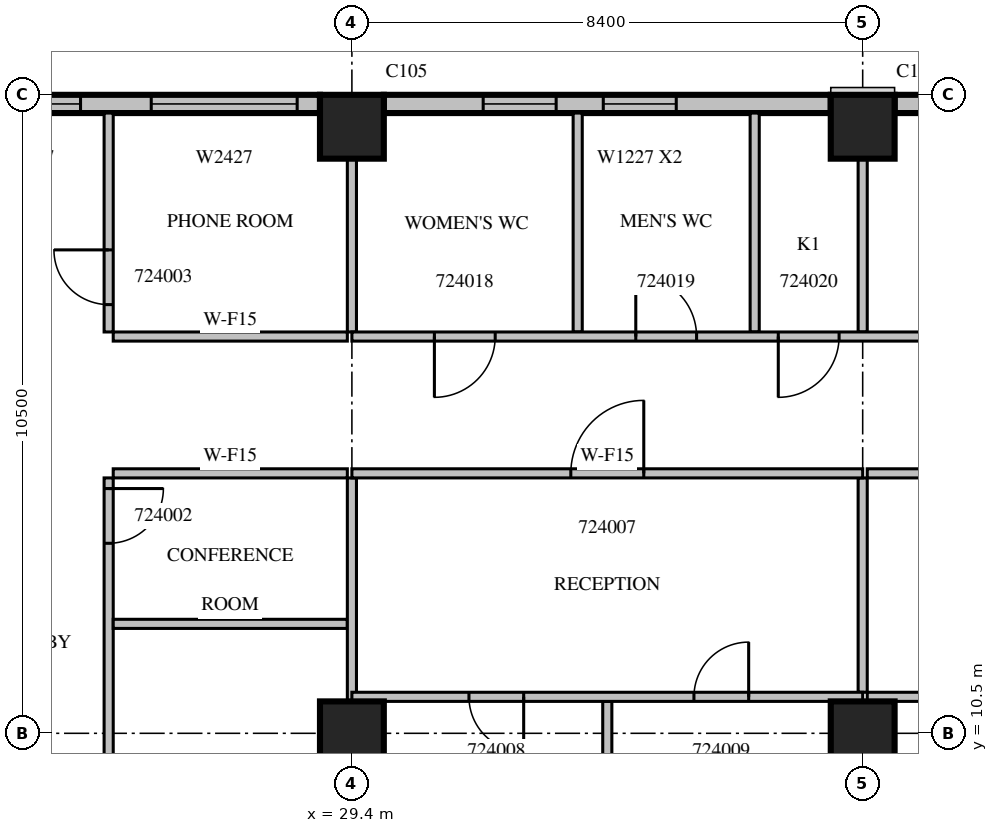
"""IFC4 building model, lengths in metres.
Left out: names, types, materials, properties, quantities, classifications, styles, units other than length and angle.
Written with IfcOpenShell. Run it as: python <this file> out.ifc"""

import sys

from ifc_helpers import new_model, si_unit, direction, frame, frame_2d, origin, origin_2d, place, context, subcontext, project, spatial, rectangle, extrude, source, transform, mapped, element, fill, save


model = new_model("IFC4")
c1 = context("Model", 3, precision=1e-05, world=origin(), true_north=direction((0.0, 1.0)))
c2 = subcontext(c1, "Body", "Model", "MODEL_VIEW")
j1 = project(units=[si_unit("LENGTHUNIT", "METRE"), si_unit("PLANEANGLEUNIT", "RADIAN")], contexts=[c1])
p1 = place(None, origin())
s1 = spatial("IfcSite", under=j1, at=p1, CompositionType="ELEMENT")
p2 = place(p1, origin())
s2 = spatial("IfcBuilding", under=s1, at=p2, CompositionType="ELEMENT")
p3 = place(p2, frame((0.0, 0.0, 111.9)))
s3 = spatial("IfcBuildingStorey", under=s2, at=p3, CompositionType="ELEMENT", Elevation=111.9)
m1 = source(origin(), c2, "Body", "SweptSolid", [
    extrude(rectangle(XDim=1.05, YDim=1.05, at=origin_2d()), origin(), (0.0, 0.0, 1.0), 4.2),
])
for number, where, z_axis, x_axis in (
    (1, (29.4, 10.5, 0.0), (0.0, 0.0, 1.0), (1.0, 0.0, 0.0)),
    (2, (37.8, 10.5, 0.0), (0.0, 0.0, 1.0), (1.0, 0.0, 0.0)),
    (3, (29.4, 20.475, 0.0), (0.0, 0.0, 1.0), (1.0, 0.0, 0.0)),
    (4, (37.8, 20.475, 0.0), (0.0, 0.0, 1.0), (1.0, 0.0, 0.0)),
):
    element("IfcColumn", number, at=place(p3, frame(where, z_axis=z_axis, x_axis=x_axis)), inside=s3, PredefinedType="COLUMN", context=c2, shape_type="MappedRepresentation", body=[
        mapped(m1, transform((0.0, 0.0, 0.0), scale=1.0)),
    ])
m2 = source(origin(), c2, "Body", "SweptSolid", [
    extrude(rectangle(XDim=7.35, YDim=0.3, at=frame_2d((3.675, 0.0))), origin(), (0.0, 0.0, 1.0), 3.8),
])
p4 = place(p3, frame((45.675, 20.85, 0.0), z_axis=(0.0, 0.0, 1.0), x_axis=(-1.0, 0.0, 0.0)))
e5 = element("IfcWall", 5, at=p4, inside=s3, PredefinedType="STANDARD", context=c2, shape_type="MappedRepresentation", body=[
    mapped(m2, transform((0.0, 0.0, 0.0), scale=1.0)),
])
m3 = source(origin(), c2, "Body", "SweptSolid", [
    extrude(rectangle(XDim=1.2, YDim=2.7, at=frame_2d((0.6, 1.35))), frame((0.0, 0.16, 0.0), z_axis=(0.0, -1.0, 0.0), x_axis=(1.0, 0.0, 0.0)), (0.0, 0.0, 1.0), 0.32),
])
p5 = place(p4, frame((2.141, 0.0, 0.6)))
e6 = element("IfcOpeningElement", 6, at=p5, cuts=e5, PredefinedType="OPENING", context=c2, shape_type="MappedRepresentation", body=[
    mapped(m3, transform((0.0, 0.0, 0.0), scale=1.0)),
])
m4 = source(origin(), c2, "Body", "SweptSolid", [
    extrude(rectangle(XDim=2.4, YDim=2.7, at=frame_2d((1.2, 1.35))), frame((0.0, 0.16, 0.0), z_axis=(0.0, -1.0, 0.0), x_axis=(1.0, 0.0, 0.0)), (0.0, 0.0, 1.0), 0.32),
])
p6 = place(p4, frame((4.213, 0.0, 0.6)))
e7 = element("IfcOpeningElement", 7, at=p6, cuts=e5, PredefinedType="OPENING", context=c2, shape_type="MappedRepresentation", body=[
    mapped(m4, transform((0.0, 0.0, 0.0), scale=1.0)),
])
p7 = place(p3, frame((37.275, 20.85, 0.0), z_axis=(0.0, 0.0, 1.0), x_axis=(-1.0, 0.0, 0.0)))
e8 = element("IfcWall", 8, at=p7, inside=s3, PredefinedType="STANDARD", context=c2, shape_type="MappedRepresentation", body=[
    mapped(m2, transform((0.0, 0.0, 0.0), scale=1.0)),
])
p8 = place(p7, frame((2.541, 0.0, 0.6)))
e9 = element("IfcOpeningElement", 9, at=p8, cuts=e8, PredefinedType="OPENING", context=c2, shape_type="MappedRepresentation", body=[
    mapped(m3, transform((0.0, 0.0, 0.0), scale=1.0)),
])
p9 = place(p7, frame((4.516, 0.0, 0.6)))
e10 = element("IfcOpeningElement", 10, at=p9, cuts=e8, PredefinedType="OPENING", context=c2, shape_type="MappedRepresentation", body=[
    mapped(m3, transform((0.0, 0.0, 0.0), scale=1.0)),
])
m5 = source(origin(), c2, "Body", "SweptSolid", [
    extrude(rectangle(XDim=6.875, YDim=0.3, at=frame_2d((3.438, 0.0))), origin(), (0.0, 0.0, 1.0), 3.8),
])
p10 = place(p3, frame((28.875, 20.85, 0.0), z_axis=(0.0, 0.0, 1.0), x_axis=(-1.0, 0.0, 0.0)))
e11 = element("IfcWall", 11, at=p10, inside=s3, PredefinedType="STANDARD", context=c2, shape_type="MappedRepresentation", body=[
    mapped(m5, transform((0.0, 0.0, 0.0), scale=1.0)),
])
p11 = place(p10, frame((0.375, 0.0, 0.6)))
e12 = element("IfcOpeningElement", 12, at=p11, cuts=e11, PredefinedType="OPENING", context=c2, shape_type="MappedRepresentation", body=[
    mapped(m4, transform((0.0, 0.0, 0.0), scale=1.0)),
])
m6 = source(origin(), c2, "Body", "SweptSolid", [
    extrude(rectangle(XDim=1.8, YDim=2.7, at=frame_2d((0.9, 1.35))), frame((0.0, 0.16, 0.0), z_axis=(0.0, -1.0, 0.0), x_axis=(1.0, 0.0, 0.0)), (0.0, 0.0, 1.0), 0.32),
])
p12 = place(p10, frame((3.938, 0.0, 0.6)))
e13 = element("IfcOpeningElement", 13, at=p12, cuts=e11, PredefinedType="OPENING", context=c2, shape_type="MappedRepresentation", body=[
    mapped(m6, transform((0.0, 0.0, 0.0), scale=1.0)),
])
p13 = place(p3, frame((25.4, 14.7, 0.0), z_axis=(0.0, 0.0, 1.0), x_axis=(0.0, -1.0, 0.0)))
e14 = element("IfcWall", 14, at=p13, inside=s3, PredefinedType="PARTITIONING", context=c2, shape_type="SweptSolid", body=[
    extrude(rectangle(XDim=11.425, YDim=0.15, at=frame_2d((5.713, 0.0))), origin(), (0.0, 0.0, 1.0), 3.8),
])
m7 = source(origin(), c2, "Body", "SweptSolid", [
    extrude(rectangle(XDim=0.9, YDim=2.1, at=frame_2d((0.45, 1.05))), frame((0.0, 0.085, 0.0), z_axis=(0.0, -1.0, 0.0), x_axis=(1.0, 0.0, 0.0)), (0.0, 0.0, 1.0), 0.17),
])
p14 = place(p13, frame((6.763, 0.0, 0.0)))
e15 = element("IfcOpeningElement", 15, at=p14, cuts=e14, PredefinedType="OPENING", context=c2, shape_type="MappedRepresentation", body=[
    mapped(m7, transform((0.0, 0.0, 0.0), scale=1.0)),
])
p15 = place(p13, frame((0.175, 0.0, 0.0)))
e16 = element("IfcOpeningElement", 16, at=p15, cuts=e14, PredefinedType="OPENING", context=c2, shape_type="MappedRepresentation", body=[
    mapped(m7, transform((0.0, 0.0, 0.0), scale=1.0)),
])
m8 = source(origin(), c2, "Body", "SweptSolid", [
    extrude(rectangle(XDim=3.6, YDim=0.15, at=frame_2d((1.8, 0.0))), origin(), (0.0, 0.0, 1.0), 3.8),
])
p16 = place(p3, frame((25.4, 20.7, 0.0), z_axis=(0.0, 0.0, 1.0), x_axis=(0.0, -1.0, 0.0)))
e17 = element("IfcWall", 17, at=p16, inside=s3, PredefinedType="PARTITIONING", context=c2, shape_type="MappedRepresentation", body=[
    mapped(m8, transform((0.0, 0.0, 0.0), scale=1.0)),
])
p17 = place(p16, frame((2.25, 0.0, 0.0)))
e18 = element("IfcOpeningElement", 18, at=p17, cuts=e17, PredefinedType="OPENING", context=c2, shape_type="MappedRepresentation", body=[
    mapped(m7, transform((0.0, 0.0, 0.0), scale=1.0)),
])
m9 = source(origin(), c2, "Body", "SweptSolid", [
    extrude(rectangle(XDim=3.85, YDim=0.15, at=frame_2d((1.925, 0.0))), origin(), (0.0, 0.0, 1.0), 3.8),
])
for number, where, z_axis, x_axis in (
    (19, (29.325, 12.3, 0.0), (0.0, 0.0, 1.0), (-1.0, 0.0, 0.0)),
    (20, (29.325, 14.775, 0.0), (0.0, 0.0, 1.0), (-1.0, 0.0, 0.0)),
    (21, (25.475, 17.025, 0.0), (0.0, 0.0, 1.0), (1.0, 0.0, 0.0)),
):
    element("IfcWall", number, at=place(p3, frame(where, z_axis=z_axis, x_axis=x_axis)), inside=s3, PredefinedType="PARTITIONING", context=c2, shape_type="MappedRepresentation", body=[
        mapped(m9, transform((0.0, 0.0, 0.0), scale=1.0)),
    ])
m10 = source(origin(), c2, "Body", "SweptSolid", [
    extrude(rectangle(XDim=3.676, YDim=0.15, at=frame_2d((1.838, 0.0))), origin(), (0.0, 0.0, 1.0), 3.8),
])
p18 = place(p3, frame((29.4, 11.024, 0.0), z_axis=(0.0, 0.0, 1.0), x_axis=(0.0, 1.0, 0.0)))
e22 = element("IfcWall", 22, at=p18, inside=s3, PredefinedType="PARTITIONING", context=c2, shape_type="MappedRepresentation", body=[
    mapped(m10, transform((0.0, 0.0, 0.0), scale=1.0)),
])
m11 = source(origin(), c2, "Body", "SweptSolid", [
    extrude(rectangle(XDim=2.851, YDim=0.15, at=frame_2d((1.425, 0.0))), origin(), (0.0, 0.0, 1.0), 3.8),
])
p19 = place(p3, frame((29.4, 17.1, 0.0), z_axis=(0.0, 0.0, 1.0), x_axis=(0.0, 1.0, 0.0)))
e23 = element("IfcWall", 23, at=p19, inside=s3, PredefinedType="PARTITIONING", context=c2, shape_type="MappedRepresentation", body=[
    mapped(m11, transform((0.0, 0.0, 0.0), scale=1.0)),
])
m12 = source(origin(), c2, "Body", "SweptSolid", [
    extrude(rectangle(XDim=6.45, YDim=0.15, at=frame_2d((3.225, 0.0))), origin(), (0.0, 0.0, 1.0), 3.8),
])
p20 = place(p3, frame((37.875, 11.1, 0.0), z_axis=(0.0, 0.0, 1.0), x_axis=(1.0, 0.0, 0.0)))
e24 = element("IfcWall", 24, at=p20, inside=s3, PredefinedType="PARTITIONING", context=c2, shape_type="MappedRepresentation", body=[
    mapped(m12, transform((0.0, 0.0, 0.0), scale=1.0)),
])
p21 = place(p3, frame((44.325, 14.775, 0.0), z_axis=(0.0, 0.0, 1.0), x_axis=(-1.0, 0.0, 0.0)))
e25 = element("IfcWall", 25, at=p21, inside=s3, PredefinedType="PARTITIONING", context=c2, shape_type="MappedRepresentation", body=[
    mapped(m12, transform((0.0, 0.0, 0.0), scale=1.0)),
])
p22 = place(p21, frame((2.812, 0.0, 0.0)))
e26 = element("IfcOpeningElement", 26, at=p22, cuts=e25, PredefinedType="OPENING", context=c2, shape_type="MappedRepresentation", body=[
    mapped(m7, transform((0.0, 0.0, 0.0), scale=1.0)),
])
m13 = source(origin(), c2, "Body", "SweptSolid", [
    extrude(rectangle(XDim=10.725, YDim=0.15, at=frame_2d((5.362, 0.0))), origin(), (0.0, 0.0, 1.0), 3.8),
])
p23 = place(p3, frame((33.6, 0.3, 0.0), z_axis=(0.0, 0.0, 1.0), x_axis=(0.0, 1.0, 0.0)))
e27 = element("IfcWall", 27, at=p23, inside=s3, PredefinedType="PARTITIONING", context=c2, shape_type="MappedRepresentation", body=[
    mapped(m13, transform((0.0, 0.0, 0.0), scale=1.0)),
])
m14 = source(origin(), c2, "Body", "SweptSolid", [
    extrude(rectangle(XDim=3.525, YDim=0.15, at=frame_2d((1.762, 0.0))), origin(), (0.0, 0.0, 1.0), 3.8),
])
p24 = place(p3, frame((37.8, 11.175, 0.0), z_axis=(0.0, 0.0, 1.0), x_axis=(0.0, 1.0, 0.0)))
e28 = element("IfcWall", 28, at=p24, inside=s3, PredefinedType="PARTITIONING", context=c2, shape_type="MappedRepresentation", body=[
    mapped(m14, transform((0.0, 0.0, 0.0), scale=1.0)),
])
m15 = source(origin(), c2, "Body", "SweptSolid", [
    extrude(rectangle(XDim=8.4, YDim=0.15, at=frame_2d((4.2, 0.0))), origin(), (0.0, 0.0, 1.0), 3.8),
])
p25 = place(p3, frame((37.8, 11.1, 0.0), z_axis=(0.0, 0.0, 1.0), x_axis=(-1.0, 0.0, 0.0)))
e29 = element("IfcWall", 29, at=p25, inside=s3, PredefinedType="PARTITIONING", context=c2, shape_type="MappedRepresentation", body=[
    mapped(m15, transform((0.0, 0.0, 0.0), scale=1.0)),
])
p26 = place(p25, frame((5.575, 0.0, 0.0)))
e30 = element("IfcOpeningElement", 30, at=p26, cuts=e29, PredefinedType="OPENING", context=c2, shape_type="MappedRepresentation", body=[
    mapped(m7, transform((0.0, 0.0, 0.0), scale=1.0)),
])
p27 = place(p25, frame((1.875, 0.0, 0.0)))
e31 = element("IfcOpeningElement", 31, at=p27, cuts=e29, PredefinedType="OPENING", context=c2, shape_type="MappedRepresentation", body=[
    mapped(m7, transform((0.0, 0.0, 0.0), scale=1.0)),
])
for number, where, z_axis, x_axis in (
    (32, (33.113, 20.7, 0.0), (0.0, 0.0, 1.0), (0.0, -1.0, 0.0)),
    (33, (36.024, 20.7, 0.0), (0.0, 0.0, 1.0), (0.0, -1.0, 0.0)),
):
    element("IfcWall", number, at=place(p3, frame(where, z_axis=z_axis, x_axis=x_axis)), inside=s3, PredefinedType="PARTITIONING", context=c2, shape_type="MappedRepresentation", body=[
        mapped(m8, transform((0.0, 0.0, 0.0), scale=1.0)),
    ])
p28 = place(p3, frame((37.8, 17.1, 0.0), z_axis=(0.0, 0.0, 1.0), x_axis=(0.0, 1.0, 0.0)))
e34 = element("IfcWall", 34, at=p28, inside=s3, PredefinedType="PARTITIONING", context=c2, shape_type="MappedRepresentation", body=[
    mapped(m11, transform((0.0, 0.0, 0.0), scale=1.0)),
])
p29 = place(p3, frame((37.8, 14.775, 0.0), z_axis=(0.0, 0.0, 1.0), x_axis=(-1.0, 0.0, 0.0)))
e35 = element("IfcWall", 35, at=p29, inside=s3, PredefinedType="PARTITIONING", context=c2, shape_type="MappedRepresentation", body=[
    mapped(m15, transform((0.0, 0.0, 0.0), scale=1.0)),
])
m16 = source(origin(), c2, "Body", "SweptSolid", [
    extrude(rectangle(XDim=1.2, YDim=2.1, at=frame_2d((0.6, 1.05))), frame((0.0, 0.085, 0.0), z_axis=(0.0, -1.0, 0.0), x_axis=(1.0, 0.0, 0.0)), (0.0, 0.0, 1.0), 0.17),
])
p30 = place(p29, frame((3.6, 0.0, 0.0)))
e36 = element("IfcOpeningElement", 36, at=p30, cuts=e35, PredefinedType="OPENING", context=c2, shape_type="MappedRepresentation", body=[
    mapped(m16, transform((0.0, 0.0, 0.0), scale=1.0)),
])
m17 = source(origin(), c2, "Body", "SweptSolid", [
    extrude(rectangle(XDim=37.5, YDim=0.15, at=frame_2d((18.75, 0.0))), origin(), (0.0, 0.0, 1.0), 3.8),
])
p31 = place(p3, frame((29.4, 17.025, 0.0), z_axis=(0.0, 0.0, 1.0), x_axis=(1.0, 0.0, 0.0)))
e37 = element("IfcWall", 37, at=p31, inside=s3, PredefinedType="PARTITIONING", context=c2, shape_type="MappedRepresentation", body=[
    mapped(m17, transform((0.0, 0.0, 0.0), scale=1.0)),
])
m18 = source(origin(), c2, "Body", "SweptSolid", [
    extrude(rectangle(XDim=1.0, YDim=2.1, at=frame_2d((0.5, 1.05))), frame((0.0, 0.085, 0.0), z_axis=(0.0, -1.0, 0.0), x_axis=(1.0, 0.0, 0.0)), (0.0, 0.0, 1.0), 0.17),
])
p32 = place(p31, frame((1.357, 0.0, 0.0)))
e38 = element("IfcOpeningElement", 38, at=p32, cuts=e37, PredefinedType="OPENING", context=c2, shape_type="MappedRepresentation", body=[
    mapped(m18, transform((0.0, 0.0, 0.0), scale=1.0)),
])
p33 = place(p31, frame((4.669, 0.0, 0.0)))
e39 = element("IfcOpeningElement", 39, at=p33, cuts=e37, PredefinedType="OPENING", context=c2, shape_type="MappedRepresentation", body=[
    mapped(m18, transform((0.0, 0.0, 0.0), scale=1.0)),
])
p34 = place(p31, frame((7.012, 0.0, 0.0)))
e40 = element("IfcOpeningElement", 40, at=p34, cuts=e37, PredefinedType="OPENING", context=c2, shape_type="MappedRepresentation", body=[
    mapped(m18, transform((0.0, 0.0, 0.0), scale=1.0)),
])
p35 = place(p31, frame((10.05, 0.0, 0.0)))
e41 = element("IfcOpeningElement", 41, at=p35, cuts=e37, PredefinedType="OPENING", context=c2, shape_type="MappedRepresentation", body=[
    mapped(m7, transform((0.0, 0.0, 0.0), scale=1.0)),
])
p36 = place(p31, frame((13.084, 0.0, 0.0)))
e42 = element("IfcOpeningElement", 42, at=p36, cuts=e37, PredefinedType="OPENING", context=c2, shape_type="MappedRepresentation", body=[
    mapped(m7, transform((0.0, 0.0, 0.0), scale=1.0)),
])
p37 = place(p31, frame((15.184, 0.0, 0.0)))
e43 = element("IfcOpeningElement", 43, at=p37, cuts=e37, PredefinedType="OPENING", context=c2, shape_type="MappedRepresentation", body=[
    mapped(m7, transform((0.0, 0.0, 0.0), scale=1.0)),
])
p38 = place(p31, frame((17.656, 0.0, 0.0)))
e44 = element("IfcOpeningElement", 44, at=p38, cuts=e37, PredefinedType="OPENING", context=c2, shape_type="MappedRepresentation", body=[
    mapped(m7, transform((0.0, 0.0, 0.0), scale=1.0)),
])
p39 = place(p31, frame((20.596, 0.0, 0.0)))
e45 = element("IfcOpeningElement", 45, at=p39, cuts=e37, PredefinedType="OPENING", context=c2, shape_type="MappedRepresentation", body=[
    mapped(m7, transform((0.0, 0.0, 0.0), scale=1.0)),
])
p40 = place(p31, frame((23.536, 0.0, 0.0)))
e46 = element("IfcOpeningElement", 46, at=p40, cuts=e37, PredefinedType="OPENING", context=c2, shape_type="MappedRepresentation", body=[
    mapped(m7, transform((0.0, 0.0, 0.0), scale=1.0)),
])
p41 = place(p31, frame((26.476, 0.0, 0.0)))
e47 = element("IfcOpeningElement", 47, at=p41, cuts=e37, PredefinedType="OPENING", context=c2, shape_type="MappedRepresentation", body=[
    mapped(m7, transform((0.0, 0.0, 0.0), scale=1.0)),
])
p42 = place(p31, frame((30.052, 0.0, 0.0)))
e48 = element("IfcOpeningElement", 48, at=p42, cuts=e37, PredefinedType="OPENING", context=c2, shape_type="MappedRepresentation", body=[
    mapped(m18, transform((0.0, 0.0, 0.0), scale=1.0)),
])
p43 = place(p31, frame((33.608, 0.0, 0.0)))
e49 = element("IfcOpeningElement", 49, at=p43, cuts=e37, PredefinedType="OPENING", context=c2, shape_type="MappedRepresentation", body=[
    mapped(m18, transform((0.0, 0.0, 0.0), scale=1.0)),
])
p44 = place(p31, frame((36.124, 0.0, 0.0)))
e50 = element("IfcOpeningElement", 50, at=p44, cuts=e37, PredefinedType="OPENING", context=c2, shape_type="MappedRepresentation", body=[
    mapped(m18, transform((0.0, 0.0, 0.0), scale=1.0)),
])
m19 = source(origin(), c2, "Body", "SweptSolid", [
    extrude(rectangle(XDim=1.2, YDim=2.7, at=frame_2d((0.6, 1.35))), frame((0.0, 0.03, 0.0), z_axis=(0.0, -1.0, 0.0), x_axis=(1.0, 0.0, 0.0)), (0.0, 0.0, 1.0), 0.06),
])
p45 = place(p8, origin())
e51 = element("IfcWindow", 51, at=p45, inside=s3, PartitioningType="SINGLE_PANEL", PredefinedType="WINDOW", context=c2, shape_type="MappedRepresentation", body=[
    mapped(m19, transform((0.0, 0.0, 0.0), scale=1.0)),
])
fill(e9, e51)
p46 = place(p9, origin())
e52 = element("IfcWindow", 52, at=p46, inside=s3, PartitioningType="SINGLE_PANEL", PredefinedType="WINDOW", context=c2, shape_type="MappedRepresentation", body=[
    mapped(m19, transform((0.0, 0.0, 0.0), scale=1.0)),
])
fill(e10, e52)
m20 = source(origin(), c2, "Body", "SweptSolid", [
    extrude(rectangle(XDim=2.4, YDim=2.7, at=frame_2d((1.2, 1.35))), frame((0.0, 0.03, 0.0), z_axis=(0.0, -1.0, 0.0), x_axis=(1.0, 0.0, 0.0)), (0.0, 0.0, 1.0), 0.06),
])
p47 = place(p11, origin())
e53 = element("IfcWindow", 53, at=p47, inside=s3, PartitioningType="SINGLE_PANEL", PredefinedType="WINDOW", context=c2, shape_type="MappedRepresentation", body=[
    mapped(m20, transform((0.0, 0.0, 0.0), scale=1.0)),
])
fill(e12, e53)
m21 = source(origin(), c2, "Body", "SweptSolid", [
    extrude(rectangle(XDim=1.8, YDim=2.7, at=frame_2d((0.9, 1.35))), frame((0.0, 0.03, 0.0), z_axis=(0.0, -1.0, 0.0), x_axis=(1.0, 0.0, 0.0)), (0.0, 0.0, 1.0), 0.06),
])
p48 = place(p12, origin())
e54 = element("IfcWindow", 54, at=p48, inside=s3, PartitioningType="SINGLE_PANEL", PredefinedType="WINDOW", context=c2, shape_type="MappedRepresentation", body=[
    mapped(m21, transform((0.0, 0.0, 0.0), scale=1.0)),
])
fill(e13, e54)
m22 = source(origin(), c2, "Body", "SweptSolid", [
    extrude(rectangle(XDim=0.9, YDim=2.1, at=frame_2d((0.45, 1.05))), frame((0.0, 0.025, 0.0), z_axis=(0.0, -1.0, 0.0), x_axis=(1.0, 0.0, 0.0)), (0.0, 0.0, 1.0), 0.05),
])
p49 = place(p15, origin())
e55 = element("IfcDoor", 55, at=p49, inside=s3, OperationType="SINGLE_SWING_LEFT", PredefinedType="DOOR", context=c2, shape_type="MappedRepresentation", body=[
    mapped(m22, transform((0.0, 0.0, 0.0), scale=1.0)),
])
fill(e16, e55)
p50 = place(p17, origin())
e56 = element("IfcDoor", 56, at=p50, inside=s3, OperationType="SINGLE_SWING_RIGHT", PredefinedType="DOOR", context=c2, shape_type="MappedRepresentation", body=[
    mapped(m22, transform((0.0, 0.0, 0.0), scale=1.0)),
])
fill(e18, e56)
m23 = source(origin(), c2, "Body", "SweptSolid", [
    extrude(rectangle(XDim=1.2, YDim=2.1, at=frame_2d((0.6, 1.05))), frame((0.0, 0.025, 0.0), z_axis=(0.0, -1.0, 0.0), x_axis=(1.0, 0.0, 0.0)), (0.0, 0.0, 1.0), 0.05),
])
p51 = place(p30, origin())
e57 = element("IfcDoor", 57, at=p51, inside=s3, OperationType="SINGLE_SWING_RIGHT", PredefinedType="DOOR", context=c2, shape_type="MappedRepresentation", body=[
    mapped(m23, transform((0.0, 0.0, 0.0), scale=1.0)),
])
fill(e36, e57)
p52 = place(p26, origin())
e58 = element("IfcDoor", 58, at=p52, inside=s3, OperationType="SINGLE_SWING_LEFT", PredefinedType="DOOR", context=c2, shape_type="MappedRepresentation", body=[
    mapped(m22, transform((0.0, 0.0, 0.0), scale=1.0)),
])
fill(e30, e58)
p53 = place(p27, origin())
e59 = element("IfcDoor", 59, at=p53, inside=s3, OperationType="SINGLE_SWING_RIGHT", PredefinedType="DOOR", context=c2, shape_type="MappedRepresentation", body=[
    mapped(m22, transform((0.0, 0.0, 0.0), scale=1.0)),
])
fill(e31, e59)
m24 = source(origin(), c2, "Body", "SweptSolid", [
    extrude(rectangle(XDim=1.0, YDim=2.1, at=frame_2d((0.5, 1.05))), frame((0.0, 0.025, 0.0), z_axis=(0.0, -1.0, 0.0), x_axis=(1.0, 0.0, 0.0)), (0.0, 0.0, 1.0), 0.05),
])
p54 = place(p32, origin())
e60 = element("IfcDoor", 60, at=p54, inside=s3, OperationType="SINGLE_SWING_RIGHT", PredefinedType="DOOR", context=c2, shape_type="MappedRepresentation", body=[
    mapped(m24, transform((0.0, 0.0, 0.0), scale=1.0)),
])
fill(e38, e60)
p55 = place(p33, origin())
e61 = element("IfcDoor", 61, at=p55, inside=s3, OperationType="SINGLE_SWING_LEFT", PredefinedType="DOOR", context=c2, shape_type="MappedRepresentation", body=[
    mapped(m24, transform((0.0, 0.0, 0.0), scale=1.0)),
])
fill(e39, e61)
p56 = place(p34, origin())
e62 = element("IfcDoor", 62, at=p56, inside=s3, OperationType="SINGLE_SWING_RIGHT", PredefinedType="DOOR", context=c2, shape_type="MappedRepresentation", body=[
    mapped(m24, transform((0.0, 0.0, 0.0), scale=1.0)),
])
fill(e40, e62)
save(model, sys.argv[1])
